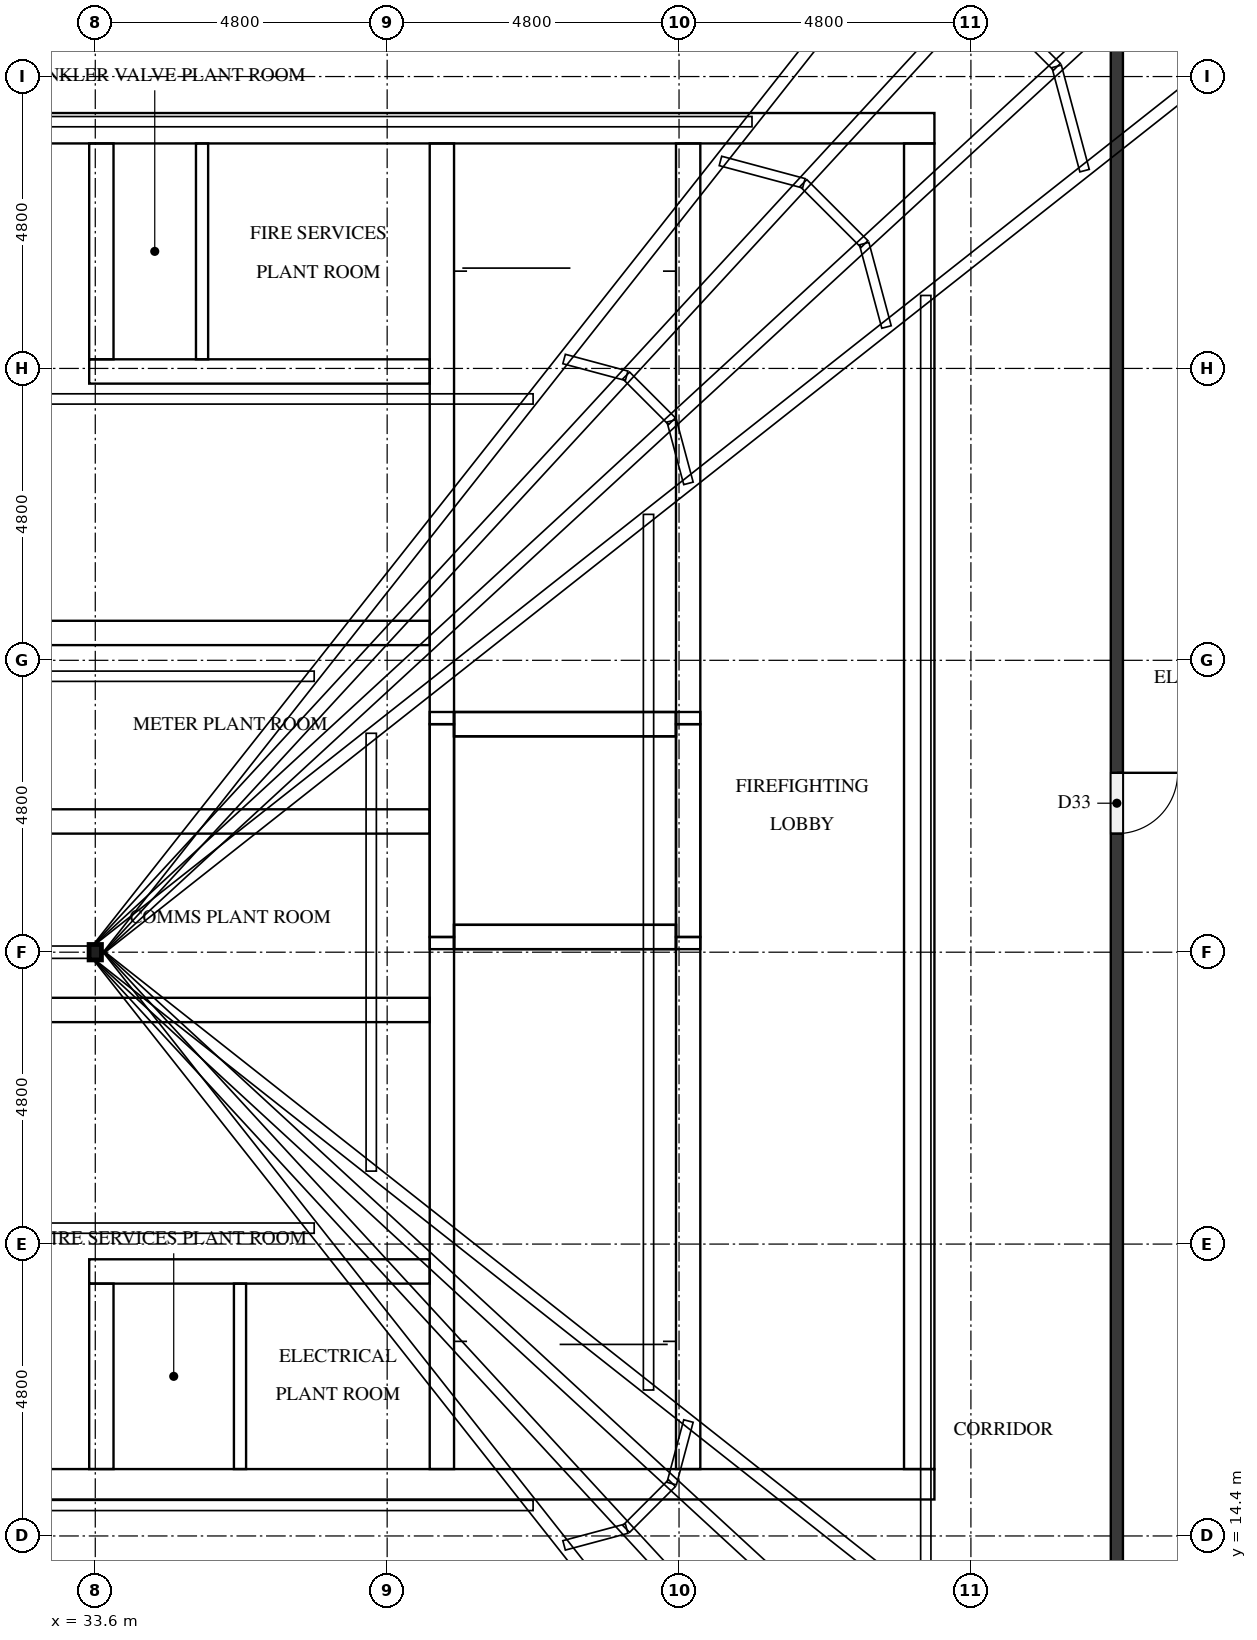
"""IFC4 building model, lengths in metres.
Left out: names, types, materials, properties, quantities, classifications, styles, units other than length and angle.
Written with IfcOpenShell. Run it as: python <this file> out.ifc"""

import sys

from ifc_helpers import new_model, si_unit, direction, frame, frame_2d, origin, origin_2d, place, context, subcontext, project, spatial, rectangle, hollow_rectangle, extrude, element, fill, save


model = new_model("IFC4")
c1 = context("Model", 3, precision=1e-05, world=origin(), true_north=direction((0.0, 1.0)))
c2 = subcontext(c1, "Body", "Model", "MODEL_VIEW")
j1 = project(units=[si_unit("LENGTHUNIT", "METRE"), si_unit("PLANEANGLEUNIT", "RADIAN")], contexts=[c1])
p1 = place(None, origin())
s1 = spatial("IfcSite", under=j1, at=p1, CompositionType="ELEMENT")
p2 = place(p1, origin())
s2 = spatial("IfcBuilding", under=s1, at=p2, CompositionType="ELEMENT")
p3 = place(p2, frame((0.0, 0.0, 317.3)))
s3 = spatial("IfcBuildingStorey", under=s2, at=p3, CompositionType="ELEMENT", Elevation=317.3)
p4 = place(p3, frame((15.0, 15.25, 0.0), z_axis=(0.0, 0.0, 1.0), x_axis=(1.0, 0.0, 0.0)))
e1 = element("IfcWall", 1, at=p4, inside=s3, PredefinedType="SHEAR", context=c2, shape_type="SweptSolid", body=[
    extrude(rectangle(XDim=32.4, YDim=0.5, at=frame_2d((16.2, 0.0))), origin(), (0.0, 0.0, 1.0), 3.0),
])
p5 = place(p4, frame((15.3, 0.0, 0.0)))
e2 = element("IfcOpeningElement", 2, at=p5, cuts=e1, PredefinedType="OPENING", context=c2, shape_type="SweptSolid", body=[
    extrude(rectangle(XDim=1.8, YDim=2.1, at=frame_2d((0.9, 1.05))), frame((0.0, 0.26, 0.0), z_axis=(0.0, -1.0, 0.0), x_axis=(1.0, 0.0, 0.0)), (0.0, 0.0, 1.0), 0.52),
])
p6 = place(p3, frame((15.0, 37.55, 0.0), z_axis=(0.0, 0.0, 1.0), x_axis=(1.0, 0.0, 0.0)))
e3 = element("IfcWall", 3, at=p6, inside=s3, PredefinedType="SHEAR", context=c2, shape_type="SweptSolid", body=[
    extrude(rectangle(XDim=32.4, YDim=0.5, at=frame_2d((16.2, 0.0))), origin(), (0.0, 0.0, 1.0), 3.0),
])
p7 = place(p6, frame((15.3, 0.0, 0.0)))
e4 = element("IfcOpeningElement", 4, at=p7, cuts=e3, PredefinedType="OPENING", context=c2, shape_type="SweptSolid", body=[
    extrude(rectangle(XDim=1.8, YDim=2.1, at=frame_2d((0.9, 1.05))), frame((0.0, 0.26, 0.0), z_axis=(0.0, -1.0, 0.0), x_axis=(1.0, 0.0, 0.0)), (0.0, 0.0, 1.0), 0.52),
])
p8 = place(p6, frame((1.282, 0.0, 0.0)))
e5 = element("IfcOpeningElement", 5, at=p8, cuts=e3, PredefinedType="OPENING", context=c2, shape_type="SweptSolid", body=[
    extrude(rectangle(XDim=1.0, YDim=2.1, at=frame_2d((0.5, 1.05))), frame((0.0, 0.26, 0.0), z_axis=(0.0, -1.0, 0.0), x_axis=(1.0, 0.0, 0.0)), (0.0, 0.0, 1.0), 0.52),
])
p9 = place(p6, frame((5.082, 0.0, 0.0)))
e6 = element("IfcOpeningElement", 6, at=p9, cuts=e3, PredefinedType="OPENING", context=c2, shape_type="SweptSolid", body=[
    extrude(rectangle(XDim=1.0, YDim=2.1, at=frame_2d((0.5, 1.05))), frame((0.0, 0.26, 0.0), z_axis=(0.0, -1.0, 0.0), x_axis=(1.0, 0.0, 0.0)), (0.0, 0.0, 1.0), 0.52),
])
p10 = place(p3, frame((47.15, 15.5, 0.0), z_axis=(0.0, 0.0, 1.0), x_axis=(0.0, 1.0, 0.0)))
e7 = element("IfcWall", 7, at=p10, inside=s3, PredefinedType="SHEAR", context=c2, shape_type="SweptSolid", body=[
    extrude(rectangle(XDim=21.8, YDim=0.5, at=frame_2d((10.9, 0.0))), origin(), (0.0, 0.0, 1.0), 3.0),
])
p11 = place(p10, frame((10.6, 0.0, 0.0)))
e8 = element("IfcOpeningElement", 8, at=p11, cuts=e7, PredefinedType="OPENING", context=c2, shape_type="SweptSolid", body=[
    extrude(rectangle(XDim=1.2, YDim=2.1, at=frame_2d((0.6, 1.05))), frame((0.0, 0.26, 0.0), z_axis=(0.0, -1.0, 0.0), x_axis=(1.0, 0.0, 0.0)), (0.0, 0.0, 1.0), 0.52),
])
p12 = place(p3, frame((39.3, 15.5, 0.0), z_axis=(0.0, 0.0, 1.0), x_axis=(0.0, 1.0, 0.0)))
e9 = element("IfcWall", 9, at=p12, inside=s3, PredefinedType="SHEAR", context=c2, shape_type="SweptSolid", body=[
    extrude(rectangle(XDim=8.75, YDim=0.4, at=frame_2d((4.375, 0.0))), origin(), (0.0, 0.0, 1.0), 3.0),
])
p13 = place(p3, frame((39.3, 24.25, 0.0), z_axis=(0.0, 0.0, 1.0), x_axis=(0.0, 1.0, 0.0)))
e10 = element("IfcWall", 10, at=p13, inside=s3, PredefinedType="SHEAR", context=c2, shape_type="SweptSolid", body=[
    extrude(rectangle(XDim=3.5, YDim=0.4, at=frame_2d((1.75, 0.0))), origin(), (0.0, 0.0, 1.0), 3.0),
])
p14 = place(p3, frame((39.3, 27.75, 0.0), z_axis=(0.0, 0.0, 1.0), x_axis=(0.0, 1.0, 0.0)))
e11 = element("IfcWall", 11, at=p14, inside=s3, PredefinedType="SHEAR", context=c2, shape_type="SweptSolid", body=[
    extrude(rectangle(XDim=9.55, YDim=0.4, at=frame_2d((4.775, 0.0))), origin(), (0.0, 0.0, 1.0), 3.0),
])
p15 = place(p3, frame((43.35, 15.5, 0.0), z_axis=(0.0, 0.0, 1.0), x_axis=(0.0, 1.0, 0.0)))
e12 = element("IfcWall", 12, at=p15, inside=s3, PredefinedType="SHEAR", context=c2, shape_type="SweptSolid", body=[
    extrude(rectangle(XDim=8.75, YDim=0.4, at=frame_2d((4.375, 0.0))), origin(), (0.0, 0.0, 1.0), 3.0),
])
p16 = place(p15, frame((0.7, 0.0, 0.0)))
e13 = element("IfcOpeningElement", 13, at=p16, cuts=e12, PredefinedType="OPENING", context=c2, shape_type="SweptSolid", body=[
    extrude(rectangle(XDim=1.2, YDim=2.1, at=frame_2d((0.6, 1.05))), frame((0.0, 0.21, 0.0), z_axis=(0.0, -1.0, 0.0), x_axis=(1.0, 0.0, 0.0)), (0.0, 0.0, 1.0), 0.42),
])
p17 = place(p3, frame((43.35, 24.25, 0.0), z_axis=(0.0, 0.0, 1.0), x_axis=(0.0, 1.0, 0.0)))
e14 = element("IfcWall", 14, at=p17, inside=s3, PredefinedType="SHEAR", context=c2, shape_type="SweptSolid", body=[
    extrude(rectangle(XDim=3.5, YDim=0.4, at=frame_2d((1.75, 0.0))), origin(), (0.0, 0.0, 1.0), 3.0),
])
p18 = place(p17, frame((1.2, 0.0, 0.0)))
e15 = element("IfcOpeningElement", 15, at=p18, cuts=e14, PredefinedType="OPENING", context=c2, shape_type="SweptSolid", body=[
    extrude(rectangle(XDim=1.1, YDim=2.1, at=frame_2d((0.55, 1.05))), frame((0.0, 0.21, 0.0), z_axis=(0.0, -1.0, 0.0), x_axis=(1.0, 0.0, 0.0)), (0.0, 0.0, 1.0), 0.42),
])
p19 = place(p3, frame((43.35, 27.75, 0.0), z_axis=(0.0, 0.0, 1.0), x_axis=(0.0, 1.0, 0.0)))
e16 = element("IfcWall", 16, at=p19, inside=s3, PredefinedType="SHEAR", context=c2, shape_type="SweptSolid", body=[
    extrude(rectangle(XDim=9.55, YDim=0.4, at=frame_2d((4.775, 0.0))), origin(), (0.0, 0.0, 1.0), 3.0),
])
p20 = place(p19, frame((7.65, 0.0, 0.0)))
e17 = element("IfcOpeningElement", 17, at=p20, cuts=e16, PredefinedType="OPENING", context=c2, shape_type="SweptSolid", body=[
    extrude(rectangle(XDim=1.2, YDim=2.1, at=frame_2d((0.6, 1.05))), frame((0.0, 0.21, 0.0), z_axis=(0.0, -1.0, 0.0), x_axis=(1.0, 0.0, 0.0)), (0.0, 0.0, 1.0), 0.42),
])
for number, where, z_axis, x_axis in (
    (18, (39.5, 24.25, 0.0), (0.0, 0.0, 1.0), (1.0, 0.0, 0.0)),
    (19, (39.5, 27.75, 0.0), (0.0, 0.0, 1.0), (1.0, 0.0, 0.0)),
):
    element("IfcWall", number, at=place(p3, frame(where, z_axis=z_axis, x_axis=x_axis)), inside=s3, PredefinedType="SHEAR", context=c2, shape_type="SweptSolid", body=[
        extrude(rectangle(XDim=3.65, YDim=0.4, at=frame_2d((1.825, 0.0))), origin(), (0.0, 0.0, 1.0), 3.0),
    ])
p21 = place(p3, frame((33.5, 18.75, 0.0), z_axis=(0.0, 0.0, 1.0), x_axis=(1.0, 0.0, 0.0)))
e20 = element("IfcWall", 20, at=p21, inside=s3, PredefinedType="SHEAR", context=c2, shape_type="SweptSolid", body=[
    extrude(rectangle(XDim=5.6, YDim=0.4, at=frame_2d((2.8, 0.0))), origin(), (0.0, 0.0, 1.0), 3.0),
])
p22 = place(p21, frame((0.89, 0.0, 0.0)))
e21 = element("IfcOpeningElement", 21, at=p22, cuts=e20, PredefinedType="OPENING", context=c2, shape_type="SweptSolid", body=[
    extrude(rectangle(XDim=1.0, YDim=2.1, at=frame_2d((0.5, 1.05))), frame((0.0, 0.21, 0.0), z_axis=(0.0, -1.0, 0.0), x_axis=(1.0, 0.0, 0.0)), (0.0, 0.0, 1.0), 0.42),
])
p23 = place(p21, frame((3.59, 0.0, 0.0)))
e22 = element("IfcOpeningElement", 22, at=p23, cuts=e20, PredefinedType="OPENING", context=c2, shape_type="SweptSolid", body=[
    extrude(rectangle(XDim=1.0, YDim=2.1, at=frame_2d((0.5, 1.05))), frame((0.0, 0.21, 0.0), z_axis=(0.0, -1.0, 0.0), x_axis=(1.0, 0.0, 0.0)), (0.0, 0.0, 1.0), 0.42),
])
p24 = place(p3, frame((23.3, 23.05, 0.0), z_axis=(0.0, 0.0, 1.0), x_axis=(1.0, 0.0, 0.0)))
e23 = element("IfcWall", 23, at=p24, inside=s3, PredefinedType="SHEAR", context=c2, shape_type="SweptSolid", body=[
    extrude(rectangle(XDim=15.8, YDim=0.4, at=frame_2d((7.9, 0.0))), origin(), (0.0, 0.0, 1.0), 3.0),
])
p25 = place(p24, frame((2.32, 0.0, 0.0)))
e24 = element("IfcOpeningElement", 24, at=p25, cuts=e23, PredefinedType="OPENING", context=c2, shape_type="SweptSolid", body=[
    extrude(rectangle(XDim=1.0, YDim=2.1, at=frame_2d((0.5, 1.05))), frame((0.0, 0.21, 0.0), z_axis=(0.0, -1.0, 0.0), x_axis=(1.0, 0.0, 0.0)), (0.0, 0.0, 1.0), 0.42),
])
p26 = place(p24, frame((6.926, 0.0, 0.0)))
e25 = element("IfcOpeningElement", 25, at=p26, cuts=e23, PredefinedType="OPENING", context=c2, shape_type="SweptSolid", body=[
    extrude(rectangle(XDim=1.0, YDim=2.1, at=frame_2d((0.5, 1.05))), frame((0.0, 0.21, 0.0), z_axis=(0.0, -1.0, 0.0), x_axis=(1.0, 0.0, 0.0)), (0.0, 0.0, 1.0), 0.42),
])
p27 = place(p24, frame((12.006, 0.0, 0.0)))
e26 = element("IfcOpeningElement", 26, at=p27, cuts=e23, PredefinedType="OPENING", context=c2, shape_type="SweptSolid", body=[
    extrude(rectangle(XDim=1.0, YDim=2.1, at=frame_2d((0.5, 1.05))), frame((0.0, 0.21, 0.0), z_axis=(0.0, -1.0, 0.0), x_axis=(1.0, 0.0, 0.0)), (0.0, 0.0, 1.0), 0.42),
])
p28 = place(p3, frame((23.3, 26.15, 0.0), z_axis=(0.0, 0.0, 1.0), x_axis=(1.0, 0.0, 0.0)))
e27 = element("IfcWall", 27, at=p28, inside=s3, PredefinedType="SHEAR", context=c2, shape_type="SweptSolid", body=[
    extrude(rectangle(XDim=15.8, YDim=0.4, at=frame_2d((7.9, 0.0))), origin(), (0.0, 0.0, 1.0), 3.0),
])
p29 = place(p3, frame((23.3, 29.25, 0.0), z_axis=(0.0, 0.0, 1.0), x_axis=(1.0, 0.0, 0.0)))
e28 = element("IfcWall", 28, at=p29, inside=s3, PredefinedType="SHEAR", context=c2, shape_type="SweptSolid", body=[
    extrude(rectangle(XDim=15.8, YDim=0.4, at=frame_2d((7.9, 0.0))), origin(), (0.0, 0.0, 1.0), 3.0),
])
p30 = place(p29, frame((2.32, 0.0, 0.0)))
e29 = element("IfcOpeningElement", 29, at=p30, cuts=e28, PredefinedType="OPENING", context=c2, shape_type="SweptSolid", body=[
    extrude(rectangle(XDim=1.0, YDim=2.1, at=frame_2d((0.5, 1.05))), frame((0.0, 0.21, 0.0), z_axis=(0.0, -1.0, 0.0), x_axis=(1.0, 0.0, 0.0)), (0.0, 0.0, 1.0), 0.42),
])
p31 = place(p29, frame((6.926, 0.0, 0.0)))
e30 = element("IfcOpeningElement", 30, at=p31, cuts=e28, PredefinedType="OPENING", context=c2, shape_type="SweptSolid", body=[
    extrude(rectangle(XDim=1.0, YDim=2.1, at=frame_2d((0.5, 1.05))), frame((0.0, 0.21, 0.0), z_axis=(0.0, -1.0, 0.0), x_axis=(1.0, 0.0, 0.0)), (0.0, 0.0, 1.0), 0.42),
])
p32 = place(p29, frame((12.006, 0.0, 0.0)))
e31 = element("IfcOpeningElement", 31, at=p32, cuts=e28, PredefinedType="OPENING", context=c2, shape_type="SweptSolid", body=[
    extrude(rectangle(XDim=1.0, YDim=2.1, at=frame_2d((0.5, 1.05))), frame((0.0, 0.21, 0.0), z_axis=(0.0, -1.0, 0.0), x_axis=(1.0, 0.0, 0.0)), (0.0, 0.0, 1.0), 0.42),
])
p33 = place(p3, frame((33.5, 33.55, 0.0), z_axis=(0.0, 0.0, 1.0), x_axis=(1.0, 0.0, 0.0)))
e32 = element("IfcWall", 32, at=p33, inside=s3, PredefinedType="SHEAR", context=c2, shape_type="SweptSolid", body=[
    extrude(rectangle(XDim=5.6, YDim=0.4, at=frame_2d((2.8, 0.0))), origin(), (0.0, 0.0, 1.0), 3.0),
])
p34 = place(p33, frame((0.578, 0.0, 0.0)))
e33 = element("IfcOpeningElement", 33, at=p34, cuts=e32, PredefinedType="OPENING", context=c2, shape_type="SweptSolid", body=[
    extrude(rectangle(XDim=1.0, YDim=2.1, at=frame_2d((0.5, 1.05))), frame((0.0, 0.21, 0.0), z_axis=(0.0, -1.0, 0.0), x_axis=(1.0, 0.0, 0.0)), (0.0, 0.0, 1.0), 0.42),
])
p35 = place(p33, frame((3.278, 0.0, 0.0)))
e34 = element("IfcOpeningElement", 34, at=p35, cuts=e32, PredefinedType="OPENING", context=c2, shape_type="SweptSolid", body=[
    extrude(rectangle(XDim=1.0, YDim=2.1, at=frame_2d((0.5, 1.05))), frame((0.0, 0.21, 0.0), z_axis=(0.0, -1.0, 0.0), x_axis=(1.0, 0.0, 0.0)), (0.0, 0.0, 1.0), 0.42),
])
p36 = place(p3, frame((33.7, 15.5, 0.0), z_axis=(0.0, 0.0, 1.0), x_axis=(0.0, 1.0, 0.0)))
e35 = element("IfcWall", 35, at=p36, inside=s3, PredefinedType="SHEAR", context=c2, shape_type="SweptSolid", body=[
    extrude(rectangle(XDim=3.05, YDim=0.4, at=frame_2d((1.525, 0.0))), origin(), (0.0, 0.0, 1.0), 3.0),
])
p37 = place(p3, frame((33.7, 33.75, 0.0), z_axis=(0.0, 0.0, 1.0), x_axis=(0.0, 1.0, 0.0)))
e36 = element("IfcWall", 36, at=p37, inside=s3, PredefinedType="SHEAR", context=c2, shape_type="SweptSolid", body=[
    extrude(rectangle(XDim=3.55, YDim=0.4, at=frame_2d((1.775, 0.0))), origin(), (0.0, 0.0, 1.0), 3.0),
])
for number, where, z_axis, x_axis in (
    (37, (39.3, 24.05, 3.0), (0.0, 0.0, 1.0), (0.0, 1.0, 0.0)),
    (38, (43.35, 24.05, 3.0), (0.0, 0.0, 1.0), (0.0, 1.0, 0.0)),
):
    element("IfcWall", number, at=place(p3, frame(where, z_axis=z_axis, x_axis=x_axis)), inside=s3, PredefinedType="SHEAR", context=c2, shape_type="SweptSolid", body=[
        extrude(rectangle(XDim=3.9, YDim=0.4, at=frame_2d((1.95, 0.0))), origin(), (0.0, 0.0, 1.0), 1.5),
    ])
for number, where, z_axis, x_axis in (
    (39, (39.5, 24.25, 3.0), (0.0, 0.0, 1.0), (1.0, 0.0, 0.0)),
    (40, (39.5, 27.75, 3.0), (0.0, 0.0, 1.0), (1.0, 0.0, 0.0)),
):
    element("IfcWall", number, at=place(p3, frame(where, z_axis=z_axis, x_axis=x_axis)), inside=s3, PredefinedType="SHEAR", context=c2, shape_type="SweptSolid", body=[
        extrude(rectangle(XDim=3.65, YDim=0.4, at=frame_2d((1.825, 0.0))), origin(), (0.0, 0.0, 1.0), 1.5),
    ])
p38 = place(p3, frame((33.6, 24.0, 0.0), z_axis=(0.0, 0.0, 1.0), x_axis=(1.0, 0.0, 0.0)))
e41 = element("IfcColumn", 41, at=p38, inside=s3, PredefinedType="COLUMN", context=c2, shape_type="SweptSolid", body=[
    extrude(hollow_rectangle(XDim=0.203, YDim=0.254, WallThickness=0.01, InnerFilletRadius=0.004, OuterFilletRadius=0.013, at=origin_2d()), origin(), (0.0, 0.0, 1.0), 6.995),
])
p39 = place(p3, frame((35.98, 15.5, 0.0), z_axis=(0.0, 0.0, 1.0), x_axis=(0.0, 1.0, 0.0)))
e42 = element("IfcWall", 42, at=p39, inside=s3, PredefinedType="PARTITIONING", context=c2, shape_type="SweptSolid", body=[
    extrude(rectangle(XDim=3.05, YDim=0.2, at=frame_2d((1.525, 0.0))), origin(), (0.0, 0.0, 1.0), 3.0),
])
p40 = place(p3, frame((35.356, 33.75, 0.0), z_axis=(0.0, 0.0, 1.0), x_axis=(0.0, 1.0, 0.0)))
e43 = element("IfcWall", 43, at=p40, inside=s3, PredefinedType="PARTITIONING", context=c2, shape_type="SweptSolid", body=[
    extrude(rectangle(XDim=3.55, YDim=0.2, at=frame_2d((1.775, 0.0))), origin(), (0.0, 0.0, 1.0), 3.0),
])
p41 = place(p3, frame((50.4, 40.7, 0.0), z_axis=(0.0, 0.0, 1.0), x_axis=(0.0, -1.0, 0.0)))
e44 = element("IfcWall", 44, at=p41, inside=s3, PredefinedType="PARTITIONING", context=c2, shape_type="SweptSolid", body=[
    extrude(rectangle(XDim=28.6, YDim=0.2, at=frame_2d((14.3, 0.0))), origin(), (0.0, 0.0, 1.0), 3.0),
])
p42 = place(p41, frame((13.75, 0.0, 0.0)))
e45 = element("IfcOpeningElement", 45, at=p42, cuts=e44, PredefinedType="OPENING", context=c2, shape_type="SweptSolid", body=[
    extrude(rectangle(XDim=1.0, YDim=2.1, at=frame_2d((0.5, 1.05))), frame((0.0, 0.11, 0.0), z_axis=(0.0, -1.0, 0.0), x_axis=(1.0, 0.0, 0.0)), (0.0, 0.0, 1.0), 0.22),
])
p43 = place(p18, origin())
e46 = element("IfcDoor", 46, at=p43, inside=s3, OperationType="DOUBLE_DOOR_SLIDING", PredefinedType="DOOR", context=c2, shape_type="SweptSolid", body=[
    extrude(rectangle(XDim=1.1, YDim=2.1, at=frame_2d((0.55, 1.05))), frame((0.0, 0.025, 0.0), z_axis=(0.0, -1.0, 0.0), x_axis=(1.0, 0.0, 0.0)), (0.0, 0.0, 1.0), 0.05),
])
fill(e15, e46)
p44 = place(p16, origin())
e47 = element("IfcDoor", 47, at=p44, inside=s3, OperationType="SINGLE_SWING_LEFT", PredefinedType="DOOR", context=c2, shape_type="SweptSolid", body=[
    extrude(rectangle(XDim=1.2, YDim=2.1, at=frame_2d((0.6, 1.05))), frame((0.0, 0.025, 0.0), z_axis=(0.0, -1.0, 0.0), x_axis=(1.0, 0.0, 0.0)), (0.0, 0.0, 1.0), 0.05),
])
fill(e13, e47)
p45 = place(p20, origin())
e48 = element("IfcDoor", 48, at=p45, inside=s3, OperationType="SINGLE_SWING_RIGHT", PredefinedType="DOOR", context=c2, shape_type="SweptSolid", body=[
    extrude(rectangle(XDim=1.2, YDim=2.1, at=frame_2d((0.6, 1.05))), frame((0.0, 0.025, 0.0), z_axis=(0.0, -1.0, 0.0), x_axis=(1.0, 0.0, 0.0)), (0.0, 0.0, 1.0), 0.05),
])
fill(e17, e48)
p46 = place(p11, origin())
e49 = element("IfcDoor", 49, at=p46, inside=s3, OperationType="SINGLE_SWING_RIGHT", PredefinedType="DOOR", context=c2, shape_type="SweptSolid", body=[
    extrude(rectangle(XDim=1.2, YDim=2.1, at=frame_2d((0.6, 1.05))), frame((0.0, 0.025, 0.0), z_axis=(0.0, -1.0, 0.0), x_axis=(1.0, 0.0, 0.0)), (0.0, 0.0, 1.0), 0.05),
])
fill(e8, e49)
p47 = place(p27, frame((1.0, 0.0, 0.0), z_axis=(0.0, 0.0, 1.0), x_axis=(-1.0, 0.0, 0.0)))
e50 = element("IfcDoor", 50, at=p47, inside=s3, OperationType="SINGLE_SWING_LEFT", PredefinedType="DOOR", context=c2, shape_type="SweptSolid", body=[
    extrude(rectangle(XDim=1.0, YDim=2.1, at=frame_2d((0.5, 1.05))), frame((0.0, 0.025, 0.0), z_axis=(0.0, -1.0, 0.0), x_axis=(1.0, 0.0, 0.0)), (0.0, 0.0, 1.0), 0.05),
])
fill(e26, e50)
p48 = place(p32, origin())
e51 = element("IfcDoor", 51, at=p48, inside=s3, OperationType="SINGLE_SWING_RIGHT", PredefinedType="DOOR", context=c2, shape_type="SweptSolid", body=[
    extrude(rectangle(XDim=1.0, YDim=2.1, at=frame_2d((0.5, 1.05))), frame((0.0, 0.025, 0.0), z_axis=(0.0, -1.0, 0.0), x_axis=(1.0, 0.0, 0.0)), (0.0, 0.0, 1.0), 0.05),
])
fill(e31, e51)
p49 = place(p22, origin())
e52 = element("IfcDoor", 52, at=p49, inside=s3, OperationType="SINGLE_SWING_LEFT", PredefinedType="DOOR", context=c2, shape_type="SweptSolid", body=[
    extrude(rectangle(XDim=1.0, YDim=2.1, at=frame_2d((0.5, 1.05))), frame((0.0, 0.025, 0.0), z_axis=(0.0, -1.0, 0.0), x_axis=(1.0, 0.0, 0.0)), (0.0, 0.0, 1.0), 0.05),
])
fill(e21, e52)
p50 = place(p23, origin())
e53 = element("IfcDoor", 53, at=p50, inside=s3, OperationType="SINGLE_SWING_RIGHT", PredefinedType="DOOR", context=c2, shape_type="SweptSolid", body=[
    extrude(rectangle(XDim=1.0, YDim=2.1, at=frame_2d((0.5, 1.05))), frame((0.0, 0.025, 0.0), z_axis=(0.0, -1.0, 0.0), x_axis=(1.0, 0.0, 0.0)), (0.0, 0.0, 1.0), 0.05),
])
fill(e22, e53)
p51 = place(p34, frame((1.0, 0.0, 0.0), z_axis=(0.0, 0.0, 1.0), x_axis=(-1.0, 0.0, 0.0)))
e54 = element("IfcDoor", 54, at=p51, inside=s3, OperationType="SINGLE_SWING_LEFT", PredefinedType="DOOR", context=c2, shape_type="SweptSolid", body=[
    extrude(rectangle(XDim=1.0, YDim=2.1, at=frame_2d((0.5, 1.05))), frame((0.0, 0.025, 0.0), z_axis=(0.0, -1.0, 0.0), x_axis=(1.0, 0.0, 0.0)), (0.0, 0.0, 1.0), 0.05),
])
fill(e33, e54)
p52 = place(p35, frame((1.0, 0.0, 0.0), z_axis=(0.0, 0.0, 1.0), x_axis=(-1.0, 0.0, 0.0)))
e55 = element("IfcDoor", 55, at=p52, inside=s3, OperationType="SINGLE_SWING_RIGHT", PredefinedType="DOOR", context=c2, shape_type="SweptSolid", body=[
    extrude(rectangle(XDim=1.0, YDim=2.1, at=frame_2d((0.5, 1.05))), frame((0.0, 0.025, 0.0), z_axis=(0.0, -1.0, 0.0), x_axis=(1.0, 0.0, 0.0)), (0.0, 0.0, 1.0), 0.05),
])
fill(e34, e55)
p53 = place(p42, origin())
e56 = element("IfcDoor", 56, at=p53, inside=s3, OperationType="SINGLE_SWING_LEFT", PredefinedType="DOOR", context=c2, shape_type="SweptSolid", body=[
    extrude(rectangle(XDim=1.0, YDim=2.1, at=frame_2d((0.5, 1.05))), frame((0.0, 0.025, 0.0), z_axis=(0.0, -1.0, 0.0), x_axis=(1.0, 0.0, 0.0)), (0.0, 0.0, 1.0), 0.05),
])
fill(e45, e56)
save(model, sys.argv[1])
